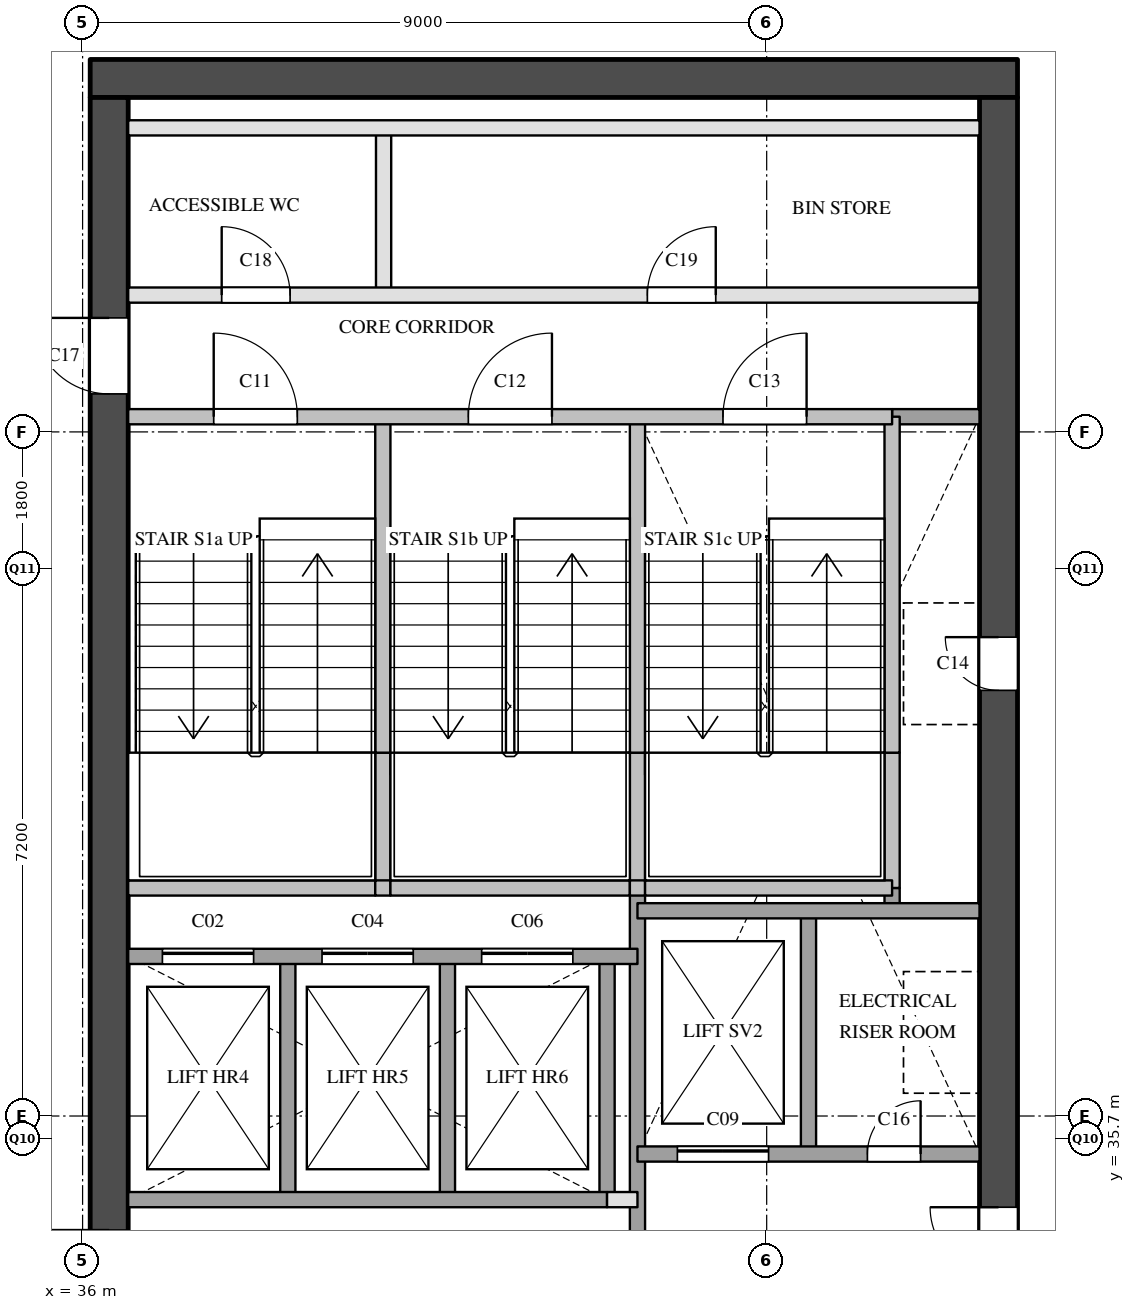
"""IFC4 building model, lengths in metres.
Left out: names, types, materials, properties, quantities, classifications, styles, units other than length and angle.
Written with IfcOpenShell. Run it as: python <this file> out.ifc"""

import sys

from ifc_helpers import new_model, si_unit, direction, frame, frame_2d, origin, place, context, subcontext, project, spatial, rectangle, extrude, element, fill, save


model = new_model("IFC4")
c1 = context("Model", 3, precision=1e-05, world=origin(), true_north=direction((0.0, 1.0)))
c2 = subcontext(c1, "Body", "Model", "MODEL_VIEW")
j1 = project(units=[si_unit("LENGTHUNIT", "METRE"), si_unit("PLANEANGLEUNIT", "RADIAN")], contexts=[c1])
p1 = place(None, origin())
s1 = spatial("IfcSite", under=j1, at=p1, CompositionType="ELEMENT")
p2 = place(p1, origin())
s2 = spatial("IfcBuilding", under=s1, at=p2, CompositionType="ELEMENT")
p3 = place(p2, frame((0.0, 0.0, 181.7)))
s3 = spatial("IfcBuildingStorey", under=s2, at=p3, CompositionType="ELEMENT", Elevation=181.7)
p4 = place(p3, frame((36.1, 49.65, 0.0), z_axis=(0.0, 0.0, 1.0), x_axis=(1.0, 0.0, 0.0)))
e1 = element("IfcWall", 1, at=p4, inside=s3, PredefinedType="SHEAR", context=c2, shape_type="SweptSolid", body=[
    extrude(rectangle(XDim=12.2, YDim=0.5, at=frame_2d((6.1, 0.0))), origin(), (0.0, 0.0, 1.0), 3.6),
])
p5 = place(p3, frame((36.35, 29.1, 0.0), z_axis=(0.0, 0.0, 1.0), x_axis=(0.0, 1.0, 0.0)))
e2 = element("IfcWall", 2, at=p5, inside=s3, PredefinedType="SHEAR", context=c2, shape_type="SweptSolid", body=[
    extrude(rectangle(XDim=20.3, YDim=0.5, at=frame_2d((10.15, 0.0))), origin(), (0.0, 0.0, 1.0), 3.6),
])
p6 = place(p5, frame((3.6, 0.0, 0.0)))
e3 = element("IfcOpeningElement", 3, at=p6, cuts=e2, PredefinedType="OPENING", context=c2, shape_type="SweptSolid", body=[
    extrude(rectangle(XDim=1.8, YDim=2.1, at=frame_2d((0.9, 1.05))), frame((0.0, 0.26, 0.0), z_axis=(0.0, -1.0, 0.0), x_axis=(1.0, 0.0, 0.0)), (0.0, 0.0, 1.0), 0.52),
])
p7 = place(p5, frame((16.4, 0.0, 0.0)))
e4 = element("IfcOpeningElement", 4, at=p7, cuts=e2, PredefinedType="OPENING", context=c2, shape_type="SweptSolid", body=[
    extrude(rectangle(XDim=1.0, YDim=2.1, at=frame_2d((0.5, 1.05))), frame((0.0, 0.26, 0.0), z_axis=(0.0, -1.0, 0.0), x_axis=(1.0, 0.0, 0.0)), (0.0, 0.0, 1.0), 0.52),
])
p8 = place(p3, frame((48.05, 29.1, 0.0), z_axis=(0.0, 0.0, 1.0), x_axis=(0.0, 1.0, 0.0)))
e5 = element("IfcWall", 5, at=p8, inside=s3, PredefinedType="SHEAR", context=c2, shape_type="SweptSolid", body=[
    extrude(rectangle(XDim=20.3, YDim=0.5, at=frame_2d((10.15, 0.0))), origin(), (0.0, 0.0, 1.0), 3.6),
])
p9 = place(p8, frame((12.5, 0.0, 0.0)))
e6 = element("IfcOpeningElement", 6, at=p9, cuts=e5, PredefinedType="OPENING", context=c2, shape_type="SweptSolid", body=[
    extrude(rectangle(XDim=0.7, YDim=2.1, at=frame_2d((0.35, 1.05))), frame((0.0, 0.26, 0.0), z_axis=(0.0, -1.0, 0.0), x_axis=(1.0, 0.0, 0.0)), (0.0, 0.0, 1.0), 0.52),
])
p10 = place(p8, frame((3.9, 0.0, 0.0)))
e7 = element("IfcOpeningElement", 7, at=p10, cuts=e5, PredefinedType="OPENING", context=c2, shape_type="SweptSolid", body=[
    extrude(rectangle(XDim=1.8, YDim=2.1, at=frame_2d((0.9, 1.05))), frame((0.0, 0.26, 0.0), z_axis=(0.0, -1.0, 0.0), x_axis=(1.0, 0.0, 0.0)), (0.0, 0.0, 1.0), 0.52),
])
p11 = place(p3, frame((38.7, 34.9, 0.0), z_axis=(0.0, 0.0, 1.0), x_axis=(0.0, 1.0, 0.0)))
e8 = element("IfcWall", 8, at=p11, inside=s3, PredefinedType="SOLIDWALL", context=c2, shape_type="SweptSolid", body=[
    extrude(rectangle(XDim=3.2, YDim=0.2, at=frame_2d((1.6, 0.0))), origin(), (0.0, 0.0, 1.0), 3.6),
])
p12 = place(p3, frame((39.95, 39.0, 0.0), z_axis=(0.0, 0.0, 1.0), x_axis=(0.0, 1.0, 0.0)))
e9 = element("IfcWall", 9, at=p12, inside=s3, PredefinedType="SOLIDWALL", context=c2, shape_type="SweptSolid", body=[
    extrude(rectangle(XDim=1.78, YDim=0.2, at=frame_2d((0.89, 0.0))), origin(), (0.0, 0.0, 1.0), 3.6),
])
p13 = place(p3, frame((39.95, 40.78, 0.0), z_axis=(0.0, 0.0, 1.0), x_axis=(0.0, 1.0, 0.0)))
e10 = element("IfcWall", 10, at=p13, inside=s3, PredefinedType="SOLIDWALL", context=c2, shape_type="SweptSolid", body=[
    extrude(rectangle(XDim=4.42, YDim=0.2, at=frame_2d((2.21, 0.0))), origin(), (0.0, 0.0, 1.0), 3.6),
])
p14 = place(p3, frame((39.96, 46.8, 0.0), z_axis=(0.0, 0.0, 1.0), x_axis=(0.0, 1.0, 0.0)))
e11 = element("IfcWall", 11, at=p14, inside=s3, PredefinedType="PARTITIONING", context=c2, shape_type="SweptSolid", body=[
    extrude(rectangle(XDim=2.2, YDim=0.2, at=frame_2d((1.1, 0.0))), origin(), (0.0, 0.0, 1.0), 3.6),
])
for number, where, z_axis, x_axis in (
    (12, (40.8, 34.9, 0.0), (0.0, 0.0, 1.0), (0.0, 1.0, 0.0)),
    (13, (42.9, 34.9, 0.0), (0.0, 0.0, 1.0), (0.0, 1.0, 0.0)),
):
    element("IfcWall", number, at=place(p3, frame(where, z_axis=z_axis, x_axis=x_axis)), inside=s3, PredefinedType="SOLIDWALL", context=c2, shape_type="SweptSolid", body=[
        extrude(rectangle(XDim=3.2, YDim=0.2, at=frame_2d((1.6, 0.0))), origin(), (0.0, 0.0, 1.0), 3.6),
    ])
p15 = place(p3, frame((43.3, 29.1, 0.0), z_axis=(0.0, 0.0, 1.0), x_axis=(0.0, 1.0, 0.0)))
e14 = element("IfcWall", 14, at=p15, inside=s3, PredefinedType="SOLIDWALL", context=c2, shape_type="SweptSolid", body=[
    extrude(rectangle(XDim=9.9, YDim=0.2, at=frame_2d((4.95, 0.0))), origin(), (0.0, 0.0, 1.0), 3.6),
])
p16 = place(p3, frame((43.3, 39.0, 0.0), z_axis=(0.0, 0.0, 1.0), x_axis=(0.0, 1.0, 0.0)))
e15 = element("IfcWall", 15, at=p16, inside=s3, PredefinedType="SOLIDWALL", context=c2, shape_type="SweptSolid", body=[
    extrude(rectangle(XDim=1.78, YDim=0.2, at=frame_2d((0.89, 0.0))), origin(), (0.0, 0.0, 1.0), 3.6),
])
p17 = place(p3, frame((43.3, 40.78, 0.0), z_axis=(0.0, 0.0, 1.0), x_axis=(0.0, 1.0, 0.0)))
e16 = element("IfcWall", 16, at=p17, inside=s3, PredefinedType="SOLIDWALL", context=c2, shape_type="SweptSolid", body=[
    extrude(rectangle(XDim=4.42, YDim=0.2, at=frame_2d((2.21, 0.0))), origin(), (0.0, 0.0, 1.0), 3.6),
])
p18 = place(p3, frame((45.55, 35.5, 0.0), z_axis=(0.0, 0.0, 1.0), x_axis=(0.0, 1.0, 0.0)))
e17 = element("IfcWall", 17, at=p18, inside=s3, PredefinedType="SOLIDWALL", context=c2, shape_type="SweptSolid", body=[
    extrude(rectangle(XDim=3.2, YDim=0.2, at=frame_2d((1.6, 0.0))), origin(), (0.0, 0.0, 1.0), 3.6),
])
p19 = place(p3, frame((46.65, 38.7, 0.0), z_axis=(0.0, 0.0, 1.0), x_axis=(0.0, 1.0, 0.0)))
e18 = element("IfcWall", 18, at=p19, inside=s3, PredefinedType="SOLIDWALL", context=c2, shape_type="SweptSolid", body=[
    extrude(rectangle(XDim=0.3, YDim=0.2, at=frame_2d((0.15, 0.0))), origin(), (0.0, 0.0, 1.0), 3.6),
])
p20 = place(p3, frame((46.65, 39.0, 0.0), z_axis=(0.0, 0.0, 1.0), x_axis=(0.0, 1.0, 0.0)))
e19 = element("IfcWall", 19, at=p20, inside=s3, PredefinedType="SOLIDWALL", context=c2, shape_type="SweptSolid", body=[
    extrude(rectangle(XDim=1.78, YDim=0.2, at=frame_2d((0.89, 0.0))), origin(), (0.0, 0.0, 1.0), 3.6),
])
p21 = place(p3, frame((46.65, 40.78, 0.0), z_axis=(0.0, 0.0, 1.0), x_axis=(0.0, 1.0, 0.0)))
e20 = element("IfcWall", 20, at=p21, inside=s3, PredefinedType="SOLIDWALL", context=c2, shape_type="SweptSolid", body=[
    extrude(rectangle(XDim=4.42, YDim=0.2, at=frame_2d((2.21, 0.0))), origin(), (0.0, 0.0, 1.0), 3.6),
])
p22 = place(p3, frame((42.9, 34.9, 0.0), z_axis=(0.0, 0.0, 1.0), x_axis=(1.0, 0.0, 0.0)))
e21 = element("IfcWall", 21, at=p22, inside=s3, PredefinedType="PARTITIONING", context=c2, shape_type="SweptSolid", body=[
    extrude(rectangle(XDim=0.4, YDim=0.2, at=frame_2d((0.2, 0.0))), origin(), (0.0, 0.0, 1.0), 3.6),
])
p23 = place(p3, frame((36.6, 34.9, 0.0), z_axis=(0.0, 0.0, 1.0), x_axis=(1.0, 0.0, 0.0)))
e22 = element("IfcWall", 22, at=p23, inside=s3, PredefinedType="SOLIDWALL", context=c2, shape_type="SweptSolid", body=[
    extrude(rectangle(XDim=6.3, YDim=0.2, at=frame_2d((3.15, 0.0))), origin(), (0.0, 0.0, 1.0), 3.6),
])
p24 = place(p3, frame((43.3, 35.5, 0.0), z_axis=(0.0, 0.0, 1.0), x_axis=(1.0, 0.0, 0.0)))
e23 = element("IfcWall", 23, at=p24, inside=s3, PredefinedType="SOLIDWALL", context=c2, shape_type="SweptSolid", body=[
    extrude(rectangle(XDim=4.5, YDim=0.2, at=frame_2d((2.25, 0.0))), origin(), (0.0, 0.0, 1.0), 3.6),
])
p25 = place(p24, frame((0.525, 0.0, 0.0)))
e24 = element("IfcOpeningElement", 24, at=p25, cuts=e23, PredefinedType="OPENING", context=c2, shape_type="SweptSolid", body=[
    extrude(rectangle(XDim=1.2, YDim=2.1, at=frame_2d((0.6, 1.05))), frame((0.0, 0.11, 0.0), z_axis=(0.0, -1.0, 0.0), x_axis=(1.0, 0.0, 0.0)), (0.0, 0.0, 1.0), 0.22),
])
p26 = place(p24, frame((3.025, 0.0, 0.0)))
e25 = element("IfcOpeningElement", 25, at=p26, cuts=e23, PredefinedType="OPENING", context=c2, shape_type="SweptSolid", body=[
    extrude(rectangle(XDim=0.7, YDim=2.1, at=frame_2d((0.35, 1.05))), frame((0.0, 0.11, 0.0), z_axis=(0.0, -1.0, 0.0), x_axis=(1.0, 0.0, 0.0)), (0.0, 0.0, 1.0), 0.22),
])
p27 = place(p3, frame((36.6, 38.1, 0.0), z_axis=(0.0, 0.0, 1.0), x_axis=(1.0, 0.0, 0.0)))
e26 = element("IfcWall", 26, at=p27, inside=s3, PredefinedType="SOLIDWALL", context=c2, shape_type="SweptSolid", body=[
    extrude(rectangle(XDim=6.7, YDim=0.2, at=frame_2d((3.35, 0.0))), origin(), (0.0, 0.0, 1.0), 3.6),
])
p28 = place(p27, frame((0.45, 0.0, 0.0)))
e27 = element("IfcOpeningElement", 27, at=p28, cuts=e26, PredefinedType="OPENING", context=c2, shape_type="SweptSolid", body=[
    extrude(rectangle(XDim=1.2, YDim=2.1, at=frame_2d((0.6, 1.05))), frame((0.0, 0.11, 0.0), z_axis=(0.0, -1.0, 0.0), x_axis=(1.0, 0.0, 0.0)), (0.0, 0.0, 1.0), 0.22),
])
p29 = place(p27, frame((2.55, 0.0, 0.0)))
e28 = element("IfcOpeningElement", 28, at=p29, cuts=e26, PredefinedType="OPENING", context=c2, shape_type="SweptSolid", body=[
    extrude(rectangle(XDim=1.2, YDim=2.1, at=frame_2d((0.6, 1.05))), frame((0.0, 0.11, 0.0), z_axis=(0.0, -1.0, 0.0), x_axis=(1.0, 0.0, 0.0)), (0.0, 0.0, 1.0), 0.22),
])
p30 = place(p27, frame((4.65, 0.0, 0.0)))
e29 = element("IfcOpeningElement", 29, at=p30, cuts=e26, PredefinedType="OPENING", context=c2, shape_type="SweptSolid", body=[
    extrude(rectangle(XDim=1.2, YDim=2.1, at=frame_2d((0.6, 1.05))), frame((0.0, 0.11, 0.0), z_axis=(0.0, -1.0, 0.0), x_axis=(1.0, 0.0, 0.0)), (0.0, 0.0, 1.0), 0.22),
])
p31 = place(p3, frame((43.3, 38.7, 0.0), z_axis=(0.0, 0.0, 1.0), x_axis=(1.0, 0.0, 0.0)))
e30 = element("IfcWall", 30, at=p31, inside=s3, PredefinedType="SOLIDWALL", context=c2, shape_type="SweptSolid", body=[
    extrude(rectangle(XDim=4.5, YDim=0.2, at=frame_2d((2.25, 0.0))), origin(), (0.0, 0.0, 1.0), 3.6),
])
p32 = place(p3, frame((36.6, 39.0, 0.0), z_axis=(0.0, 0.0, 1.0), x_axis=(1.0, 0.0, 0.0)))
e31 = element("IfcWall", 31, at=p32, inside=s3, PredefinedType="SOLIDWALL", context=c2, shape_type="SweptSolid", body=[
    extrude(rectangle(XDim=3.25, YDim=0.2, at=frame_2d((1.625, 0.0))), origin(), (0.0, 0.0, 1.0), 3.6),
])
p33 = place(p3, frame((39.85, 39.0, 0.0), z_axis=(0.0, 0.0, 1.0), x_axis=(1.0, 0.0, 0.0)))
e32 = element("IfcWall", 32, at=p33, inside=s3, PredefinedType="SOLIDWALL", context=c2, shape_type="SweptSolid", body=[
    extrude(rectangle(XDim=0.2, YDim=0.2, at=frame_2d((0.1, 0.0))), origin(), (0.0, 0.0, 1.0), 3.6),
])
p34 = place(p3, frame((40.05, 39.0, 0.0), z_axis=(0.0, 0.0, 1.0), x_axis=(1.0, 0.0, 0.0)))
e33 = element("IfcWall", 33, at=p34, inside=s3, PredefinedType="SOLIDWALL", context=c2, shape_type="SweptSolid", body=[
    extrude(rectangle(XDim=3.15, YDim=0.2, at=frame_2d((1.575, 0.0))), origin(), (0.0, 0.0, 1.0), 3.6),
])
p35 = place(p3, frame((43.2, 39.0, 0.0), z_axis=(0.0, 0.0, 1.0), x_axis=(1.0, 0.0, 0.0)))
e34 = element("IfcWall", 34, at=p35, inside=s3, PredefinedType="SOLIDWALL", context=c2, shape_type="SweptSolid", body=[
    extrude(rectangle(XDim=0.2, YDim=0.2, at=frame_2d((0.1, 0.0))), origin(), (0.0, 0.0, 1.0), 3.6),
])
p36 = place(p3, frame((43.4, 39.0, 0.0), z_axis=(0.0, 0.0, 1.0), x_axis=(1.0, 0.0, 0.0)))
e35 = element("IfcWall", 35, at=p36, inside=s3, PredefinedType="SOLIDWALL", context=c2, shape_type="SweptSolid", body=[
    extrude(rectangle(XDim=3.25, YDim=0.2, at=frame_2d((1.625, 0.0))), origin(), (0.0, 0.0, 1.0), 3.6),
])
p37 = place(p3, frame((46.65, 45.2, 0.0), z_axis=(0.0, 0.0, 1.0), x_axis=(1.0, 0.0, 0.0)))
e36 = element("IfcWall", 36, at=p37, inside=s3, PredefinedType="SOLIDWALL", context=c2, shape_type="SweptSolid", body=[
    extrude(rectangle(XDim=1.15, YDim=0.2, at=frame_2d((0.575, 0.0))), origin(), (0.0, 0.0, 1.0), 3.6),
])
p38 = place(p3, frame((36.6, 45.2, 0.0), z_axis=(0.0, 0.0, 1.0), x_axis=(1.0, 0.0, 0.0)))
e37 = element("IfcWall", 37, at=p38, inside=s3, PredefinedType="SOLIDWALL", context=c2, shape_type="SweptSolid", body=[
    extrude(rectangle(XDim=10.05, YDim=0.2, at=frame_2d((5.025, 0.0))), origin(), (0.0, 0.0, 1.0), 3.6),
])
p39 = place(p38, frame((1.125, 0.0, 0.0)))
e38 = element("IfcOpeningElement", 38, at=p39, cuts=e37, PredefinedType="OPENING", context=c2, shape_type="SweptSolid", body=[
    extrude(rectangle(XDim=1.1, YDim=2.1, at=frame_2d((0.55, 1.05))), frame((0.0, 0.11, 0.0), z_axis=(0.0, -1.0, 0.0), x_axis=(1.0, 0.0, 0.0)), (0.0, 0.0, 1.0), 0.22),
])
p40 = place(p38, frame((4.475, 0.0, 0.0)))
e39 = element("IfcOpeningElement", 39, at=p40, cuts=e37, PredefinedType="OPENING", context=c2, shape_type="SweptSolid", body=[
    extrude(rectangle(XDim=1.1, YDim=2.1, at=frame_2d((0.55, 1.05))), frame((0.0, 0.11, 0.0), z_axis=(0.0, -1.0, 0.0), x_axis=(1.0, 0.0, 0.0)), (0.0, 0.0, 1.0), 0.22),
])
p41 = place(p38, frame((7.825, 0.0, 0.0)))
e40 = element("IfcOpeningElement", 40, at=p41, cuts=e37, PredefinedType="OPENING", context=c2, shape_type="SweptSolid", body=[
    extrude(rectangle(XDim=1.1, YDim=2.1, at=frame_2d((0.55, 1.05))), frame((0.0, 0.11, 0.0), z_axis=(0.0, -1.0, 0.0), x_axis=(1.0, 0.0, 0.0)), (0.0, 0.0, 1.0), 0.22),
])
p42 = place(p3, frame((36.6, 46.8, 0.0), z_axis=(0.0, 0.0, 1.0), x_axis=(1.0, 0.0, 0.0)))
e41 = element("IfcWall", 41, at=p42, inside=s3, PredefinedType="PARTITIONING", context=c2, shape_type="SweptSolid", body=[
    extrude(rectangle(XDim=11.2, YDim=0.2, at=frame_2d((5.6, 0.0))), origin(), (0.0, 0.0, 1.0), 3.6),
])
p43 = place(p42, frame((1.23, 0.0, 0.0)))
e42 = element("IfcOpeningElement", 42, at=p43, cuts=e41, PredefinedType="OPENING", context=c2, shape_type="SweptSolid", body=[
    extrude(rectangle(XDim=0.9, YDim=2.1, at=frame_2d((0.45, 1.05))), frame((0.0, 0.11, 0.0), z_axis=(0.0, -1.0, 0.0), x_axis=(1.0, 0.0, 0.0)), (0.0, 0.0, 1.0), 0.22),
])
p44 = place(p42, frame((6.83, 0.0, 0.0)))
e43 = element("IfcOpeningElement", 43, at=p44, cuts=e41, PredefinedType="OPENING", context=c2, shape_type="SweptSolid", body=[
    extrude(rectangle(XDim=0.9, YDim=2.1, at=frame_2d((0.45, 1.05))), frame((0.0, 0.11, 0.0), z_axis=(0.0, -1.0, 0.0), x_axis=(1.0, 0.0, 0.0)), (0.0, 0.0, 1.0), 0.22),
])
p45 = place(p3, frame((36.6, 49.0, 0.0), z_axis=(0.0, 0.0, 1.0), x_axis=(1.0, 0.0, 0.0)))
e44 = element("IfcWall", 44, at=p45, inside=s3, PredefinedType="PARTITIONING", context=c2, shape_type="SweptSolid", body=[
    extrude(rectangle(XDim=11.2, YDim=0.2, at=frame_2d((5.6, 0.0))), origin(), (0.0, 0.0, 1.0), 3.6),
])
p46 = place(p28, origin())
e45 = element("IfcDoor", 45, at=p46, inside=s3, OperationType="SLIDING_TO_LEFT", PredefinedType="DOOR", context=c2, shape_type="SweptSolid", body=[
    extrude(rectangle(XDim=1.2, YDim=2.1, at=frame_2d((0.6, 1.05))), frame((0.0, 0.025, 0.0), z_axis=(0.0, -1.0, 0.0), x_axis=(1.0, 0.0, 0.0)), (0.0, 0.0, 1.0), 0.05),
])
fill(e27, e45)
p47 = place(p29, origin())
e46 = element("IfcDoor", 46, at=p47, inside=s3, OperationType="SLIDING_TO_LEFT", PredefinedType="DOOR", context=c2, shape_type="SweptSolid", body=[
    extrude(rectangle(XDim=1.2, YDim=2.1, at=frame_2d((0.6, 1.05))), frame((0.0, 0.025, 0.0), z_axis=(0.0, -1.0, 0.0), x_axis=(1.0, 0.0, 0.0)), (0.0, 0.0, 1.0), 0.05),
])
fill(e28, e46)
p48 = place(p30, origin())
e47 = element("IfcDoor", 47, at=p48, inside=s3, OperationType="SLIDING_TO_LEFT", PredefinedType="DOOR", context=c2, shape_type="SweptSolid", body=[
    extrude(rectangle(XDim=1.2, YDim=2.1, at=frame_2d((0.6, 1.05))), frame((0.0, 0.025, 0.0), z_axis=(0.0, -1.0, 0.0), x_axis=(1.0, 0.0, 0.0)), (0.0, 0.0, 1.0), 0.05),
])
fill(e29, e47)
p49 = place(p25, origin())
e48 = element("IfcDoor", 48, at=p49, inside=s3, OperationType="SLIDING_TO_LEFT", PredefinedType="DOOR", context=c2, shape_type="SweptSolid", body=[
    extrude(rectangle(XDim=1.2, YDim=2.1, at=frame_2d((0.6, 1.05))), frame((0.0, 0.025, 0.0), z_axis=(0.0, -1.0, 0.0), x_axis=(1.0, 0.0, 0.0)), (0.0, 0.0, 1.0), 0.05),
])
fill(e24, e48)
p50 = place(p6, origin())
e49 = element("IfcDoor", 49, at=p50, inside=s3, OperationType="DOUBLE_DOOR_SINGLE_SWING", PredefinedType="DOOR", context=c2, shape_type="SweptSolid", body=[
    extrude(rectangle(XDim=1.8, YDim=2.1, at=frame_2d((0.9, 1.05))), frame((0.0, 0.025, 0.0), z_axis=(0.0, -1.0, 0.0), x_axis=(1.0, 0.0, 0.0)), (0.0, 0.0, 1.0), 0.05),
])
fill(e3, e49)
p51 = place(p39, origin())
e50 = element("IfcDoor", 50, at=p51, inside=s3, OperationType="SINGLE_SWING_LEFT", PredefinedType="DOOR", context=c2, shape_type="SweptSolid", body=[
    extrude(rectangle(XDim=1.1, YDim=2.1, at=frame_2d((0.55, 1.05))), frame((0.0, 0.025, 0.0), z_axis=(0.0, -1.0, 0.0), x_axis=(1.0, 0.0, 0.0)), (0.0, 0.0, 1.0), 0.05),
])
fill(e38, e50)
p52 = place(p40, origin())
e51 = element("IfcDoor", 51, at=p52, inside=s3, OperationType="SINGLE_SWING_RIGHT", PredefinedType="DOOR", context=c2, shape_type="SweptSolid", body=[
    extrude(rectangle(XDim=1.1, YDim=2.1, at=frame_2d((0.55, 1.05))), frame((0.0, 0.025, 0.0), z_axis=(0.0, -1.0, 0.0), x_axis=(1.0, 0.0, 0.0)), (0.0, 0.0, 1.0), 0.05),
])
fill(e39, e51)
p53 = place(p41, origin())
e52 = element("IfcDoor", 52, at=p53, inside=s3, OperationType="SINGLE_SWING_RIGHT", PredefinedType="DOOR", context=c2, shape_type="SweptSolid", body=[
    extrude(rectangle(XDim=1.1, YDim=2.1, at=frame_2d((0.55, 1.05))), frame((0.0, 0.025, 0.0), z_axis=(0.0, -1.0, 0.0), x_axis=(1.0, 0.0, 0.0)), (0.0, 0.0, 1.0), 0.05),
])
fill(e40, e52)
p54 = place(p9, origin())
e53 = element("IfcDoor", 53, at=p54, inside=s3, OperationType="SINGLE_SWING_RIGHT", PredefinedType="DOOR", context=c2, shape_type="SweptSolid", body=[
    extrude(rectangle(XDim=0.7, YDim=2.1, at=frame_2d((0.35, 1.05))), frame((0.0, 0.025, 0.0), z_axis=(0.0, -1.0, 0.0), x_axis=(1.0, 0.0, 0.0)), (0.0, 0.0, 1.0), 0.05),
])
fill(e6, e53)
p55 = place(p10, origin())
e54 = element("IfcDoor", 54, at=p55, inside=s3, OperationType="DOUBLE_DOOR_SINGLE_SWING", PredefinedType="DOOR", context=c2, shape_type="SweptSolid", body=[
    extrude(rectangle(XDim=1.8, YDim=2.1, at=frame_2d((0.9, 1.05))), frame((0.0, 0.025, 0.0), z_axis=(0.0, -1.0, 0.0), x_axis=(1.0, 0.0, 0.0)), (0.0, 0.0, 1.0), 0.05),
])
fill(e7, e54)
p56 = place(p26, origin())
e55 = element("IfcDoor", 55, at=p56, inside=s3, OperationType="SINGLE_SWING_RIGHT", PredefinedType="DOOR", context=c2, shape_type="SweptSolid", body=[
    extrude(rectangle(XDim=0.7, YDim=2.1, at=frame_2d((0.35, 1.05))), frame((0.0, 0.025, 0.0), z_axis=(0.0, -1.0, 0.0), x_axis=(1.0, 0.0, 0.0)), (0.0, 0.0, 1.0), 0.05),
])
fill(e25, e55)
p57 = place(p7, origin())
e56 = element("IfcDoor", 56, at=p57, inside=s3, OperationType="SINGLE_SWING_RIGHT", PredefinedType="DOOR", context=c2, shape_type="SweptSolid", body=[
    extrude(rectangle(XDim=1.0, YDim=2.1, at=frame_2d((0.5, 1.05))), frame((0.0, 0.025, 0.0), z_axis=(0.0, -1.0, 0.0), x_axis=(1.0, 0.0, 0.0)), (0.0, 0.0, 1.0), 0.05),
])
fill(e4, e56)
p58 = place(p43, origin())
e57 = element("IfcDoor", 57, at=p58, inside=s3, OperationType="SINGLE_SWING_LEFT", PredefinedType="DOOR", context=c2, shape_type="SweptSolid", body=[
    extrude(rectangle(XDim=0.9, YDim=2.1, at=frame_2d((0.45, 1.05))), frame((0.0, 0.025, 0.0), z_axis=(0.0, -1.0, 0.0), x_axis=(1.0, 0.0, 0.0)), (0.0, 0.0, 1.0), 0.05),
])
fill(e42, e57)
p59 = place(p44, origin())
e58 = element("IfcDoor", 58, at=p59, inside=s3, OperationType="SINGLE_SWING_RIGHT", PredefinedType="DOOR", context=c2, shape_type="SweptSolid", body=[
    extrude(rectangle(XDim=0.9, YDim=2.1, at=frame_2d((0.45, 1.05))), frame((0.0, 0.025, 0.0), z_axis=(0.0, -1.0, 0.0), x_axis=(1.0, 0.0, 0.0)), (0.0, 0.0, 1.0), 0.05),
])
fill(e43, e58)
save(model, sys.argv[1])
